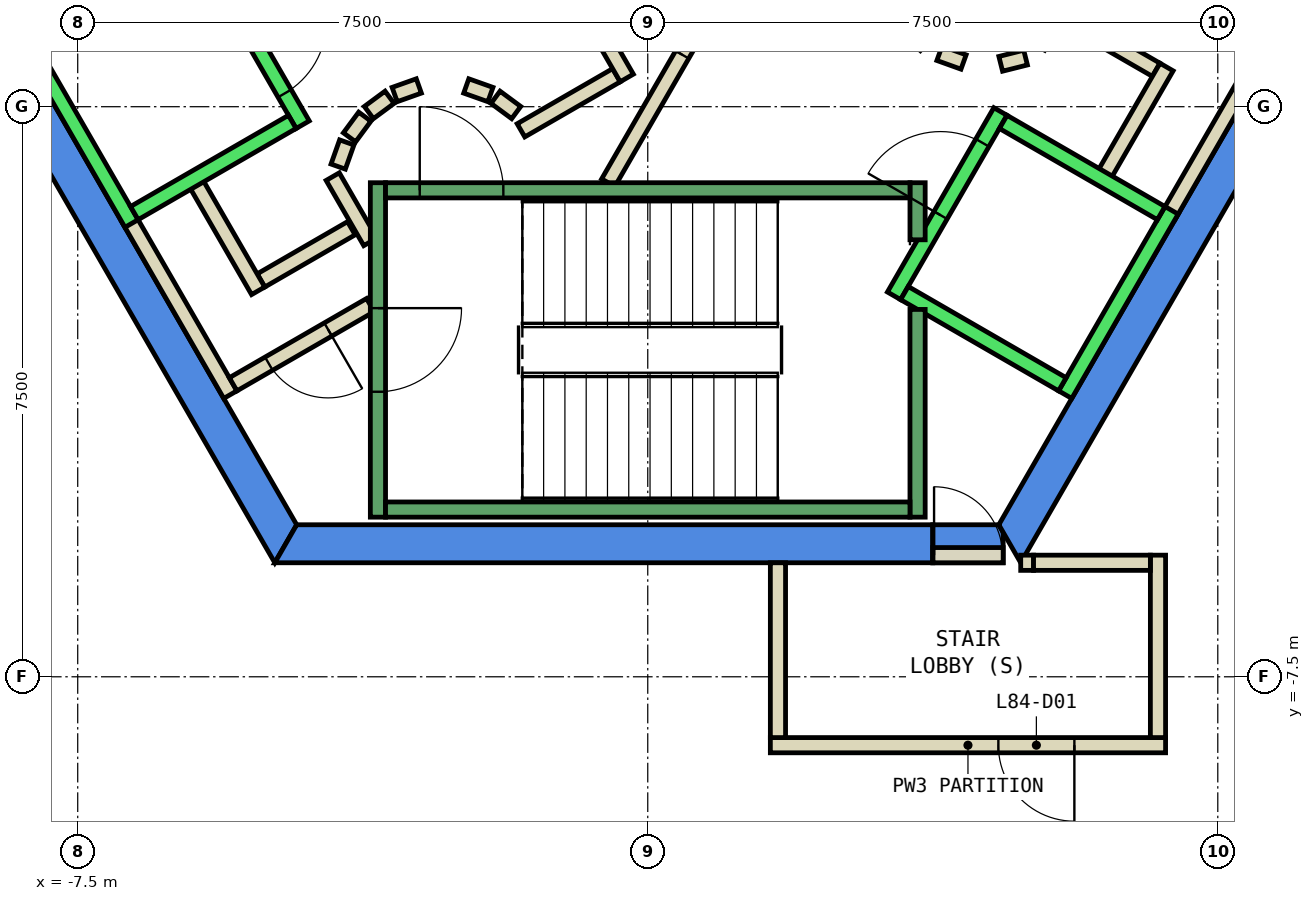
"""IFC4 building model, lengths in metres.
Left out: names, types, materials, properties, quantities, classifications, styles, units other than length and angle.
Written with IfcOpenShell. Run it as: python <this file> out.ifc"""

import sys

from ifc_helpers import new_model, si_unit, direction, frame, frame_2d, origin, place, context, subcontext, project, spatial, polyline, rectangle, outline, extrude, element, fill, save


model = new_model("IFC4")
c1 = context("Model", 3, precision=1e-05, world=origin(), true_north=direction((0.0, 1.0)))
c2 = subcontext(c1, "Body", "Model", "MODEL_VIEW")
j1 = project(units=[si_unit("LENGTHUNIT", "METRE"), si_unit("PLANEANGLEUNIT", "RADIAN")], contexts=[c1])
p1 = place(None, origin())
s1 = spatial("IfcSite", under=j1, at=p1, CompositionType="ELEMENT")
p2 = place(p1, origin())
s2 = spatial("IfcBuilding", under=s1, at=p2, CompositionType="ELEMENT")
p3 = place(p2, frame((0.0, 0.0, 358.4)))
s3 = spatial("IfcBuildingStorey", under=s2, at=p3, CompositionType="ELEMENT", Elevation=358.4)
p4 = place(p3, frame((0.0, 0.0, -0.45)))
e1 = element("IfcWall", 1, at=p4, inside=s3, PredefinedType="SHEAR", context=c2, shape_type="SweptSolid", body=[
    extrude(outline(polyline([(-9.815, 2.5), (-4.907, -6.0), (-4.619, -5.5), (-9.238, 2.5), (-9.815, 2.5)])), origin(), (0.0, 0.0, 1.0), 4.5),
])
p5 = place(p3, frame((0.0, 0.0, -0.45)))
e2 = element("IfcWall", 2, at=p5, inside=s3, PredefinedType="SHEAR", context=c2, shape_type="SweptSolid", body=[
    extrude(outline(polyline([(3.75, -6.0), (3.75, -5.5), (-4.619, -5.5), (-4.907, -6.0), (3.75, -6.0)])), origin(), (0.0, 0.0, 1.0), 4.5),
])
p6 = place(p3, frame((0.0, 0.0, 3.6)))
e3 = element("IfcWall", 3, at=p6, inside=s3, PredefinedType="SHEAR", context=c2, shape_type="SweptSolid", body=[
    extrude(outline(polyline([(4.676, -6.0), (4.676, -5.6), (4.619, -5.5), (3.75, -5.5), (3.75, -6.0), (4.676, -6.0)])), origin(), (0.0, 0.0, 1.0), 0.45),
])
p7 = place(p3, frame((0.0, 0.0, -0.45)))
e4 = element("IfcWall", 4, at=p7, inside=s3, PredefinedType="SHEAR", context=c2, shape_type="SweptSolid", body=[
    extrude(outline(polyline([(4.907, -6.0), (9.815, 2.5), (9.238, 2.5), (4.619, -5.5), (4.907, -6.0)])), origin(), (0.0, 0.0, 1.0), 4.5),
])
p8 = place(p3, frame((5.499, 1.172, 0.0), z_axis=(0.0, 0.0, 1.0), x_axis=(0.866333505267, -0.499465972466, 0.0)))
e5 = element("IfcWall", 5, at=p8, inside=s3, PredefinedType="PARTITIONING", context=c2, shape_type="SweptSolid", body=[
    extrude(rectangle(XDim=1.374, YDim=0.2, at=frame_2d((0.687, 0.0))), origin(), (0.0, 0.0, 1.0), 4.05),
])
p9 = place(p3, frame((6.826, 0.522, 0.0), z_axis=(0.0, 0.0, 1.0), x_axis=(-0.500016722714, -0.866015748706, 0.0)))
e6 = element("IfcWall", 6, at=p9, inside=s3, PredefinedType="PARTITIONING", context=c2, shape_type="SweptSolid", body=[
    extrude(rectangle(XDim=1.7, YDim=0.2, at=frame_2d((0.85, 0.0))), origin(), (0.0, 0.0, 1.0), 4.05),
])
p10 = place(p3, frame((8.192, 0.888, 0.0), z_axis=(0.0, 0.0, 1.0), x_axis=(-0.499940625693, -0.866059680843, 0.0)))
e7 = element("IfcWall", 7, at=p10, inside=s3, PredefinedType="PARTITIONING", context=c2, shape_type="SweptSolid", body=[
    extrude(rectangle(XDim=2.68, YDim=0.2, at=frame_2d((1.34, 0.0))), origin(), (0.0, 0.0, 1.0), 4.05),
])
p11 = place(p3, frame((-3.9, -1.599, 0.0), z_axis=(0.0, 0.0, 1.0), x_axis=(-0.865969445389, -0.500096910261, 0.0)))
e8 = element("IfcWall", 8, at=p11, inside=s3, PredefinedType="PARTITIONING", context=c2, shape_type="SweptSolid", body=[
    extrude(rectangle(XDim=1.373, YDim=0.2, at=frame_2d((0.687, 0.0))), origin(), (0.0, 0.0, 1.0), 4.05),
])
p12 = place(p3, frame((-5.126, -2.422, 0.0), z_axis=(0.0, 0.0, 1.0), x_axis=(-0.500062241894, 0.865989465428, 0.0)))
e9 = element("IfcWall", 9, at=p12, inside=s3, PredefinedType="PARTITIONING", context=c2, shape_type="SweptSolid", body=[
    extrude(rectangle(XDim=1.7, YDim=0.2, at=frame_2d((0.85, 0.0))), origin(), (0.0, 0.0, 1.0), 4.05),
])
p13 = place(p3, frame((-5.492, -3.788, 0.0), z_axis=(0.0, 0.0, 1.0), x_axis=(-0.500008949224, 0.866020236886, 0.0)))
e10 = element("IfcWall", 10, at=p13, inside=s3, PredefinedType="PARTITIONING", context=c2, shape_type="SweptSolid", body=[
    extrude(rectangle(XDim=2.68, YDim=0.2, at=frame_2d((1.34, 0.0))), origin(), (0.0, 0.0, 1.0), 4.05),
])
p14 = place(p3, frame((-4.145, -0.92, 0.0), z_axis=(0.0, 0.0, 1.0), x_axis=(0.499743786207, -0.866173278362, 0.0)))
e11 = element("IfcWall", 11, at=p14, inside=s3, PredefinedType="PARTITIONING", context=c2, shape_type="SweptSolid", body=[
    extrude(rectangle(XDim=0.991, YDim=0.2, at=frame_2d((0.495, 0.0))), origin(), (0.0, 0.0, 1.0), 4.05),
])
p15 = place(p3, frame((-3.65, -2.61, 0.0), z_axis=(0.0, 0.0, 1.0), x_axis=(-0.866072462134, -0.499918483688, 0.0)))
e12 = element("IfcWall", 12, at=p15, inside=s3, PredefinedType="PARTITIONING", context=c2, shape_type="SweptSolid", body=[
    extrude(rectangle(XDim=2.084, YDim=0.2, at=frame_2d((1.042, 0.0))), origin(), (0.0, 0.0, 1.0), 4.05),
])
p16 = place(p15, frame((0.642, 0.0, 0.0)))
e13 = element("IfcOpeningElement", 13, at=p16, cuts=e12, PredefinedType="OPENING", context=c2, shape_type="SweptSolid", body=[
    extrude(rectangle(XDim=0.9, YDim=2.1, at=frame_2d((0.45, 1.05))), frame((0.0, 0.11, 0.0), z_axis=(0.0, -1.0, 0.0), x_axis=(1.0, 0.0, 0.0)), (0.0, 0.0, 1.0), 0.22),
])
p17 = place(p3, frame((3.838, 0.702, 0.0), z_axis=(0.0, 0.0, 1.0), x_axis=(0.941035081519, -0.338308993895, 0.0)))
e14 = element("IfcWall", 14, at=p17, inside=s3, PredefinedType="PARTITIONING", context=c2, shape_type="SweptSolid", body=[
    extrude(rectangle(XDim=0.337, YDim=0.2, at=frame_2d((0.168, 0.0))), origin(), (0.0, 0.0, 1.0), 4.05),
])
p18 = place(p3, frame((4.644, 0.564, 0.0), z_axis=(0.0, 0.0, 1.0), x_axis=(0.969929076366, 0.243387729394, 0.0)))
e15 = element("IfcWall", 15, at=p18, inside=s3, PredefinedType="PARTITIONING", context=c2, shape_type="SweptSolid", body=[
    extrude(rectangle(XDim=0.337, YDim=0.2, at=frame_2d((0.168, 0.0))), origin(), (0.0, 0.0, 1.0), 4.05),
])
p19 = place(p3, frame((-0.52, -1.0, 0.0), z_axis=(0.0, 0.0, 1.0), x_axis=(0.50011622646, 0.865958290007, 0.0)))
e16 = element("IfcWall", 16, at=p19, inside=s3, PredefinedType="PARTITIONING", context=c2, shape_type="SweptSolid", body=[
    extrude(rectangle(XDim=4.991, YDim=0.2, at=frame_2d((2.496, 0.0))), origin(), (0.0, 0.0, 1.0), 4.05),
])
p20 = place(p19, frame((1.945, 0.0, 0.0)))
e17 = element("IfcOpeningElement", 17, at=p20, cuts=e16, PredefinedType="OPENING", context=c2, shape_type="SweptSolid", body=[
    extrude(rectangle(XDim=1.0, YDim=2.1, at=frame_2d((0.5, 1.05))), frame((0.0, 0.11, 0.0), z_axis=(0.0, -1.0, 0.0), x_axis=(1.0, 0.0, 0.0)), (0.0, 0.0, 1.0), 0.22),
])
p21 = place(p3, frame((-0.412, 0.414, 0.0), z_axis=(0.0, 0.0, 1.0), x_axis=(-0.866017369001, -0.500013916395, 0.0)))
e18 = element("IfcWall", 18, at=p21, inside=s3, PredefinedType="PARTITIONING", context=c2, shape_type="SweptSolid", body=[
    extrude(rectangle(XDim=1.45, YDim=0.2, at=frame_2d((0.725, 0.0))), origin(), (0.0, 0.0, 1.0), 4.05),
])
p22 = place(p3, frame((-1.731, -0.077, 0.0), z_axis=(0.0, 0.0, 1.0), x_axis=(-0.804311165252, 0.594208338422, 0.0)))
e19 = element("IfcWall", 19, at=p22, inside=s3, PredefinedType="PARTITIONING", context=c2, shape_type="SweptSolid", body=[
    extrude(rectangle(XDim=0.338, YDim=0.2, at=frame_2d((0.169, 0.0))), origin(), (0.0, 0.0, 1.0), 4.05),
])
p23 = place(p3, frame((-2.07, 0.16, 0.0), z_axis=(0.0, 0.0, 1.0), x_axis=(-0.942199461132, 0.335052496547, 0.0)))
e20 = element("IfcWall", 20, at=p23, inside=s3, PredefinedType="PARTITIONING", context=c2, shape_type="SweptSolid", body=[
    extrude(rectangle(XDim=0.337, YDim=0.2, at=frame_2d((0.169, 0.0))), origin(), (0.0, 0.0, 1.0), 4.05),
])
p24 = place(p3, frame((-3.012, 0.273, 0.0), z_axis=(0.0, 0.0, 1.0), x_axis=(-0.942280615813, -0.334824194261, 0.0)))
e21 = element("IfcWall", 21, at=p24, inside=s3, PredefinedType="PARTITIONING", context=c2, shape_type="SweptSolid", body=[
    extrude(rectangle(XDim=0.338, YDim=0.2, at=frame_2d((0.169, 0.0))), origin(), (0.0, 0.0, 1.0), 4.05),
])
p25 = place(p3, frame((-3.397, 0.124, 0.0), z_axis=(0.0, 0.0, 1.0), x_axis=(-0.804311165252, -0.594208338422, 0.0)))
e22 = element("IfcWall", 22, at=p25, inside=s3, PredefinedType="PARTITIONING", context=c2, shape_type="SweptSolid", body=[
    extrude(rectangle(XDim=0.338, YDim=0.2, at=frame_2d((0.169, 0.0))), origin(), (0.0, 0.0, 1.0), 4.05),
])
p26 = place(p3, frame((-3.723, -0.131, 0.0), z_axis=(0.0, 0.0, 1.0), x_axis=(-0.594675113454, -0.803966112121, 0.0)))
e23 = element("IfcWall", 23, at=p26, inside=s3, PredefinedType="PARTITIONING", context=c2, shape_type="SweptSolid", body=[
    extrude(rectangle(XDim=0.338, YDim=0.2, at=frame_2d((0.169, 0.0))), origin(), (0.0, 0.0, 1.0), 4.05),
])
p27 = place(p3, frame((-3.96, -0.47, 0.0), z_axis=(0.0, 0.0, 1.0), x_axis=(-0.334824194261, -0.942280615813, 0.0)))
e24 = element("IfcWall", 24, at=p27, inside=s3, PredefinedType="PARTITIONING", context=c2, shape_type="SweptSolid", body=[
    extrude(rectangle(XDim=0.338, YDim=0.2, at=frame_2d((0.169, 0.0))), origin(), (0.0, 0.0, 1.0), 4.05),
])
p28 = place(p3, frame((-2.771, 4.7, 0.0), z_axis=(0.0, 0.0, 1.0), x_axis=(0.499969479948, -0.866043023828, 0.0)))
e25 = element("IfcWall", 25, at=p28, inside=s3, PredefinedType="PARTITIONING", context=c2, shape_type="SweptSolid", body=[
    extrude(rectangle(XDim=4.99, YDim=0.2, at=frame_2d((2.495, 0.0))), origin(), (0.0, 0.0, 1.0), 4.05),
])
p29 = place(p28, frame((1.945, 0.0, 0.0)))
e26 = element("IfcOpeningElement", 26, at=p29, cuts=e25, PredefinedType="OPENING", context=c2, shape_type="SweptSolid", body=[
    extrude(rectangle(XDim=1.0, YDim=2.1, at=frame_2d((0.5, 1.05))), frame((0.0, 0.11, 0.0), z_axis=(0.0, -1.0, 0.0), x_axis=(1.0, 0.0, 0.0)), (0.0, 0.0, 1.0), 0.22),
])
p30 = place(p3, frame((6.813, -8.4, 0.0), z_axis=(0.0, 0.0, 1.0), x_axis=(-1.0, 0.0, 0.0)))
e27 = element("IfcWall", 27, at=p30, inside=s3, PredefinedType="PARTITIONING", context=c2, shape_type="SweptSolid", body=[
    extrude(rectangle(XDim=5.2, YDim=0.2, at=frame_2d((2.6, 0.0))), origin(), (0.0, 0.0, 1.0), 4.05),
])
p31 = place(p30, frame((1.2, 0.0, 0.0)))
e28 = element("IfcOpeningElement", 28, at=p31, cuts=e27, PredefinedType="OPENING", context=c2, shape_type="SweptSolid", body=[
    extrude(rectangle(XDim=1.0, YDim=2.1, at=frame_2d((0.5, 1.05))), frame((0.0, 0.11, 0.0), z_axis=(0.0, -1.0, 0.0), x_axis=(1.0, 0.0, 0.0)), (0.0, 0.0, 1.0), 0.22),
])
p32 = place(p3, frame((1.713, -8.3, 0.0), z_axis=(0.0, 0.0, 1.0), x_axis=(0.0, 1.0, 0.0)))
e29 = element("IfcWall", 29, at=p32, inside=s3, PredefinedType="PARTITIONING", context=c2, shape_type="SweptSolid", body=[
    extrude(rectangle(XDim=2.3, YDim=0.2, at=frame_2d((1.15, 0.0))), origin(), (0.0, 0.0, 1.0), 4.05),
])
p33 = place(p3, frame((4.907, -6.0, 0.0), z_axis=(0.0, 0.0, 1.0), x_axis=(1.0, 0.0, 0.0)))
e30 = element("IfcWall", 30, at=p33, inside=s3, PredefinedType="PARTITIONING", context=c2, shape_type="SweptSolid", body=[
    extrude(rectangle(XDim=0.169, YDim=0.2, at=frame_2d((0.084, 0.0))), origin(), (0.0, 0.0, 1.0), 2.4),
])
p34 = place(p3, frame((6.713, -5.9, 0.0), z_axis=(0.0, 0.0, 1.0), x_axis=(0.0, -1.0, 0.0)))
e31 = element("IfcWall", 31, at=p34, inside=s3, PredefinedType="PARTITIONING", context=c2, shape_type="SweptSolid", body=[
    extrude(rectangle(XDim=2.4, YDim=0.2, at=frame_2d((1.2, 0.0))), origin(), (0.0, 0.0, 1.0), 4.05),
])
p35 = place(p3, frame((3.75, -5.9, 0.0), z_axis=(0.0, 0.0, 1.0), x_axis=(1.0, 0.0, 0.0)))
e32 = element("IfcWall", 32, at=p35, inside=s3, PredefinedType="PARTITIONING", context=c2, shape_type="SweptSolid", body=[
    extrude(rectangle(XDim=0.926, YDim=0.2, at=frame_2d((0.463, 0.0))), origin(), (0.0, 0.0, 1.0), 2.4),
])
p36 = place(p35, frame((0.017, 0.0, 0.0)))
e33 = element("IfcOpeningElement", 33, at=p36, cuts=e32, PredefinedType="OPENING", context=c2, shape_type="SweptSolid", body=[
    extrude(rectangle(XDim=0.9, YDim=2.1, at=frame_2d((0.45, 1.05))), frame((0.0, 0.11, 0.0), z_axis=(0.0, -1.0, 0.0), x_axis=(1.0, 0.0, 0.0)), (0.0, 0.0, 1.0), 0.22),
])
p37 = place(p3, frame((5.076, -6.0, 0.0), z_axis=(0.0, 0.0, 1.0), x_axis=(1.0, 0.0, 0.0)))
e34 = element("IfcWall", 34, at=p37, inside=s3, PredefinedType="PARTITIONING", context=c2, shape_type="SweptSolid", body=[
    extrude(rectangle(XDim=1.537, YDim=0.2, at=frame_2d((0.769, 0.0))), origin(), (0.0, 0.0, 1.0), 4.05),
])
p38 = place(p3, frame((-5.94, 2.188, 0.0), z_axis=(0.0, 0.0, 1.0), x_axis=(0.49994636267, -0.866056369097, 0.0)))
e35 = element("IfcWall", 35, at=p38, inside=s3, PredefinedType="STANDARD", context=c2, shape_type="SweptSolid", body=[
    extrude(rectangle(XDim=2.8, YDim=0.2, at=frame_2d((1.4, 0.0))), origin(), (0.0, 0.0, 1.0), 4.05),
])
p39 = place(p38, frame((1.225, 0.0, 0.0)))
e36 = element("IfcOpeningElement", 36, at=p39, cuts=e35, PredefinedType="OPENING", context=c2, shape_type="SweptSolid", body=[
    extrude(rectangle(XDim=1.1, YDim=2.1, at=frame_2d((0.55, 1.05))), frame((0.0, 0.11, 0.0), z_axis=(0.0, -1.0, 0.0), x_axis=(1.0, 0.0, 0.0)), (0.0, 0.0, 1.0), 0.22),
])
p40 = place(p3, frame((-8.192, 0.888, 0.0), z_axis=(0.0, 0.0, 1.0), x_axis=(0.49994636267, -0.866056369097, 0.0)))
e37 = element("IfcWall", 37, at=p40, inside=s3, PredefinedType="STANDARD", context=c2, shape_type="SweptSolid", body=[
    extrude(rectangle(XDim=2.8, YDim=0.2, at=frame_2d((1.4, 0.0))), origin(), (0.0, 0.0, 1.0), 4.05),
])
p41 = place(p3, frame((-4.677, -0.2, 0.0), z_axis=(0.0, 0.0, 1.0), x_axis=(-0.865973769406, -0.500089422704, 0.0)))
e38 = element("IfcWall", 38, at=p41, inside=s3, PredefinedType="STANDARD", context=c2, shape_type="SweptSolid", body=[
    extrude(rectangle(XDim=2.399, YDim=0.2, at=frame_2d((1.2, 0.0))), origin(), (0.0, 0.0, 1.0), 4.05),
])
p42 = place(p3, frame((3.24, -2.488, 0.0), z_axis=(0.0, 0.0, 1.0), x_axis=(0.49994636267, 0.866056369097, 0.0)))
e39 = element("IfcWall", 39, at=p42, inside=s3, PredefinedType="STANDARD", context=c2, shape_type="SweptSolid", body=[
    extrude(rectangle(XDim=2.8, YDim=0.2, at=frame_2d((1.4, 0.0))), origin(), (0.0, 0.0, 1.0), 4.05),
])
p43 = place(p42, frame((1.225, 0.0, 0.0)))
e40 = element("IfcOpeningElement", 40, at=p43, cuts=e39, PredefinedType="OPENING", context=c2, shape_type="SweptSolid", body=[
    extrude(rectangle(XDim=1.1, YDim=2.1, at=frame_2d((0.55, 1.05))), frame((0.0, 0.11, 0.0), z_axis=(0.0, -1.0, 0.0), x_axis=(1.0, 0.0, 0.0)), (0.0, 0.0, 1.0), 0.22),
])
p44 = place(p3, frame((5.492, -3.788, 0.0), z_axis=(0.0, 0.0, 1.0), x_axis=(0.500011755427, 0.866018616679, 0.0)))
e41 = element("IfcWall", 41, at=p44, inside=s3, PredefinedType="STANDARD", context=c2, shape_type="SweptSolid", body=[
    extrude(rectangle(XDim=2.8, YDim=0.2, at=frame_2d((1.4, 0.0))), origin(), (0.0, 0.0, 1.0), 4.05),
])
p45 = place(p3, frame((3.377, -2.452, 0.0), z_axis=(0.0, 0.0, 1.0), x_axis=(0.865955154139, -0.50012165622, 0.0)))
e42 = element("IfcWall", 42, at=p45, inside=s3, PredefinedType="STANDARD", context=c2, shape_type="SweptSolid", body=[
    extrude(rectangle(XDim=2.4, YDim=0.2, at=frame_2d((1.2, 0.0))), origin(), (0.0, 0.0, 1.0), 4.05),
])
p46 = place(p3, frame((4.677, -0.2, 0.0), z_axis=(0.0, 0.0, 1.0), x_axis=(0.865973769406, -0.500089422704, 0.0)))
e43 = element("IfcWall", 43, at=p46, inside=s3, PredefinedType="STANDARD", context=c2, shape_type="SweptSolid", body=[
    extrude(rectangle(XDim=2.399, YDim=0.2, at=frame_2d((1.2, 0.0))), origin(), (0.0, 0.0, 1.0), 4.05),
])
p47 = place(p3, frame((-3.55, -1.0, 0.0), z_axis=(0.0, 0.0, 1.0), x_axis=(0.0, -1.0, 0.0)))
e44 = element("IfcWall", 44, at=p47, inside=s3, PredefinedType="STANDARD", context=c2, shape_type="SweptSolid", body=[
    extrude(rectangle(XDim=4.4, YDim=0.2, at=frame_2d((2.2, 0.0))), origin(), (0.0, 0.0, 1.0), 4.05),
])
p48 = place(p47, frame((1.65, 0.0, 0.0)))
e45 = element("IfcOpeningElement", 45, at=p48, cuts=e44, PredefinedType="OPENING", context=c2, shape_type="SweptSolid", body=[
    extrude(rectangle(XDim=1.1, YDim=2.2, at=frame_2d((0.55, 1.1))), frame((0.0, 0.11, 0.0), z_axis=(0.0, -1.0, 0.0), x_axis=(1.0, 0.0, 0.0)), (0.0, 0.0, 1.0), 0.22),
])
p49 = place(p3, frame((3.55, -2.667, 0.0), z_axis=(0.0, 0.0, 1.0), x_axis=(0.0, -1.0, 0.0)))
e46 = element("IfcWall", 46, at=p49, inside=s3, PredefinedType="STANDARD", context=c2, shape_type="SweptSolid", body=[
    extrude(rectangle(XDim=2.733, YDim=0.2, at=frame_2d((1.366, 0.0))), origin(), (0.0, 0.0, 1.0), 4.05),
])
p50 = place(p3, frame((3.55, -1.0, 0.0), z_axis=(0.0, 0.0, 1.0), x_axis=(0.0, -1.0, 0.0)))
e47 = element("IfcWall", 47, at=p50, inside=s3, PredefinedType="STANDARD", context=c2, shape_type="SweptSolid", body=[
    extrude(rectangle(XDim=0.751, YDim=0.2, at=frame_2d((0.375, 0.0))), origin(), (0.0, 0.0, 1.0), 4.05),
])
p51 = place(p3, frame((-3.45, -1.1, 0.0), z_axis=(0.0, 0.0, 1.0), x_axis=(1.0, 0.0, 0.0)))
e48 = element("IfcWall", 48, at=p51, inside=s3, PredefinedType="STANDARD", context=c2, shape_type="SweptSolid", body=[
    extrude(rectangle(XDim=6.9, YDim=0.2, at=frame_2d((3.45, 0.0))), origin(), (0.0, 0.0, 1.0), 4.05),
])
p52 = place(p51, frame((0.45, 0.0, 0.0)))
e49 = element("IfcOpeningElement", 49, at=p52, cuts=e48, PredefinedType="OPENING", context=c2, shape_type="SweptSolid", body=[
    extrude(rectangle(XDim=1.1, YDim=2.2, at=frame_2d((0.55, 1.1))), frame((0.0, 0.11, 0.0), z_axis=(0.0, -1.0, 0.0), x_axis=(1.0, 0.0, 0.0)), (0.0, 0.0, 1.0), 0.22),
])
p53 = place(p3, frame((-3.45, -5.3, 0.0), z_axis=(0.0, 0.0, 1.0), x_axis=(1.0, 0.0, 0.0)))
e50 = element("IfcWall", 50, at=p53, inside=s3, PredefinedType="STANDARD", context=c2, shape_type="SweptSolid", body=[
    extrude(rectangle(XDim=6.9, YDim=0.2, at=frame_2d((3.45, 0.0))), origin(), (0.0, 0.0, 1.0), 4.05),
])
p54 = place(p31, origin())
e51 = element("IfcDoor", 51, at=p54, inside=s3, OperationType="SINGLE_SWING_LEFT", PredefinedType="DOOR", context=c2, shape_type="SweptSolid", body=[
    extrude(rectangle(XDim=1.0, YDim=2.1, at=frame_2d((0.5, 1.05))), frame((0.0, 0.025, 0.0), z_axis=(0.0, -1.0, 0.0), x_axis=(1.0, 0.0, 0.0)), (0.0, 0.0, 1.0), 0.05),
])
fill(e28, e51)
p55 = place(p20, origin())
e52 = element("IfcDoor", 52, at=p55, inside=s3, OperationType="SINGLE_SWING_LEFT", PredefinedType="DOOR", context=c2, shape_type="SweptSolid", body=[
    extrude(rectangle(XDim=1.0, YDim=2.1, at=frame_2d((0.5, 1.05))), frame((0.0, 0.025, 0.0), z_axis=(0.0, -1.0, 0.0), x_axis=(1.0, 0.0, 0.0)), (0.0, 0.0, 1.0), 0.05),
])
fill(e17, e52)
p56 = place(p16, origin())
e53 = element("IfcDoor", 53, at=p56, inside=s3, OperationType="SINGLE_SWING_LEFT", PredefinedType="DOOR", context=c2, shape_type="SweptSolid", body=[
    extrude(rectangle(XDim=0.9, YDim=2.1, at=frame_2d((0.45, 1.05))), frame((0.0, 0.025, 0.0), z_axis=(0.0, -1.0, 0.0), x_axis=(1.0, 0.0, 0.0)), (0.0, 0.0, 1.0), 0.05),
])
fill(e13, e53)
p57 = place(p36, origin())
e54 = element("IfcDoor", 54, at=p57, inside=s3, OperationType="SINGLE_SWING_LEFT", PredefinedType="DOOR", context=c2, shape_type="SweptSolid", body=[
    extrude(rectangle(XDim=0.9, YDim=2.1, at=frame_2d((0.45, 1.05))), frame((0.0, 0.025, 0.0), z_axis=(0.0, -1.0, 0.0), x_axis=(1.0, 0.0, 0.0)), (0.0, 0.0, 1.0), 0.05),
])
fill(e33, e54)
p58 = place(p43, origin())
e55 = element("IfcDoor", 55, at=p58, inside=s3, OperationType="SLIDING_TO_LEFT", PredefinedType="DOOR", context=c2, shape_type="SweptSolid", body=[
    extrude(rectangle(XDim=1.1, YDim=2.1, at=frame_2d((0.55, 1.05))), frame((0.0, 0.025, 0.0), z_axis=(0.0, -1.0, 0.0), x_axis=(1.0, 0.0, 0.0)), (0.0, 0.0, 1.0), 0.05),
])
fill(e40, e55)
p59 = place(p39, origin())
e56 = element("IfcDoor", 56, at=p59, inside=s3, OperationType="SLIDING_TO_LEFT", PredefinedType="DOOR", context=c2, shape_type="SweptSolid", body=[
    extrude(rectangle(XDim=1.1, YDim=2.1, at=frame_2d((0.55, 1.05))), frame((0.0, 0.025, 0.0), z_axis=(0.0, -1.0, 0.0), x_axis=(1.0, 0.0, 0.0)), (0.0, 0.0, 1.0), 0.05),
])
fill(e36, e56)
p60 = place(p52, origin())
e57 = element("IfcDoor", 57, at=p60, inside=s3, OperationType="SINGLE_SWING_LEFT", PredefinedType="DOOR", context=c2, shape_type="SweptSolid", body=[
    extrude(rectangle(XDim=1.1, YDim=2.2, at=frame_2d((0.55, 1.1))), frame((0.0, 0.025, 0.0), z_axis=(0.0, -1.0, 0.0), x_axis=(1.0, 0.0, 0.0)), (0.0, 0.0, 1.0), 0.05),
])
fill(e49, e57)
p61 = place(p48, origin())
e58 = element("IfcDoor", 58, at=p61, inside=s3, OperationType="SINGLE_SWING_LEFT", PredefinedType="DOOR", context=c2, shape_type="SweptSolid", body=[
    extrude(rectangle(XDim=1.1, YDim=2.2, at=frame_2d((0.55, 1.1))), frame((0.0, 0.025, 0.0), z_axis=(0.0, -1.0, 0.0), x_axis=(1.0, 0.0, 0.0)), (0.0, 0.0, 1.0), 0.05),
])
fill(e45, e58)
save(model, sys.argv[1])
